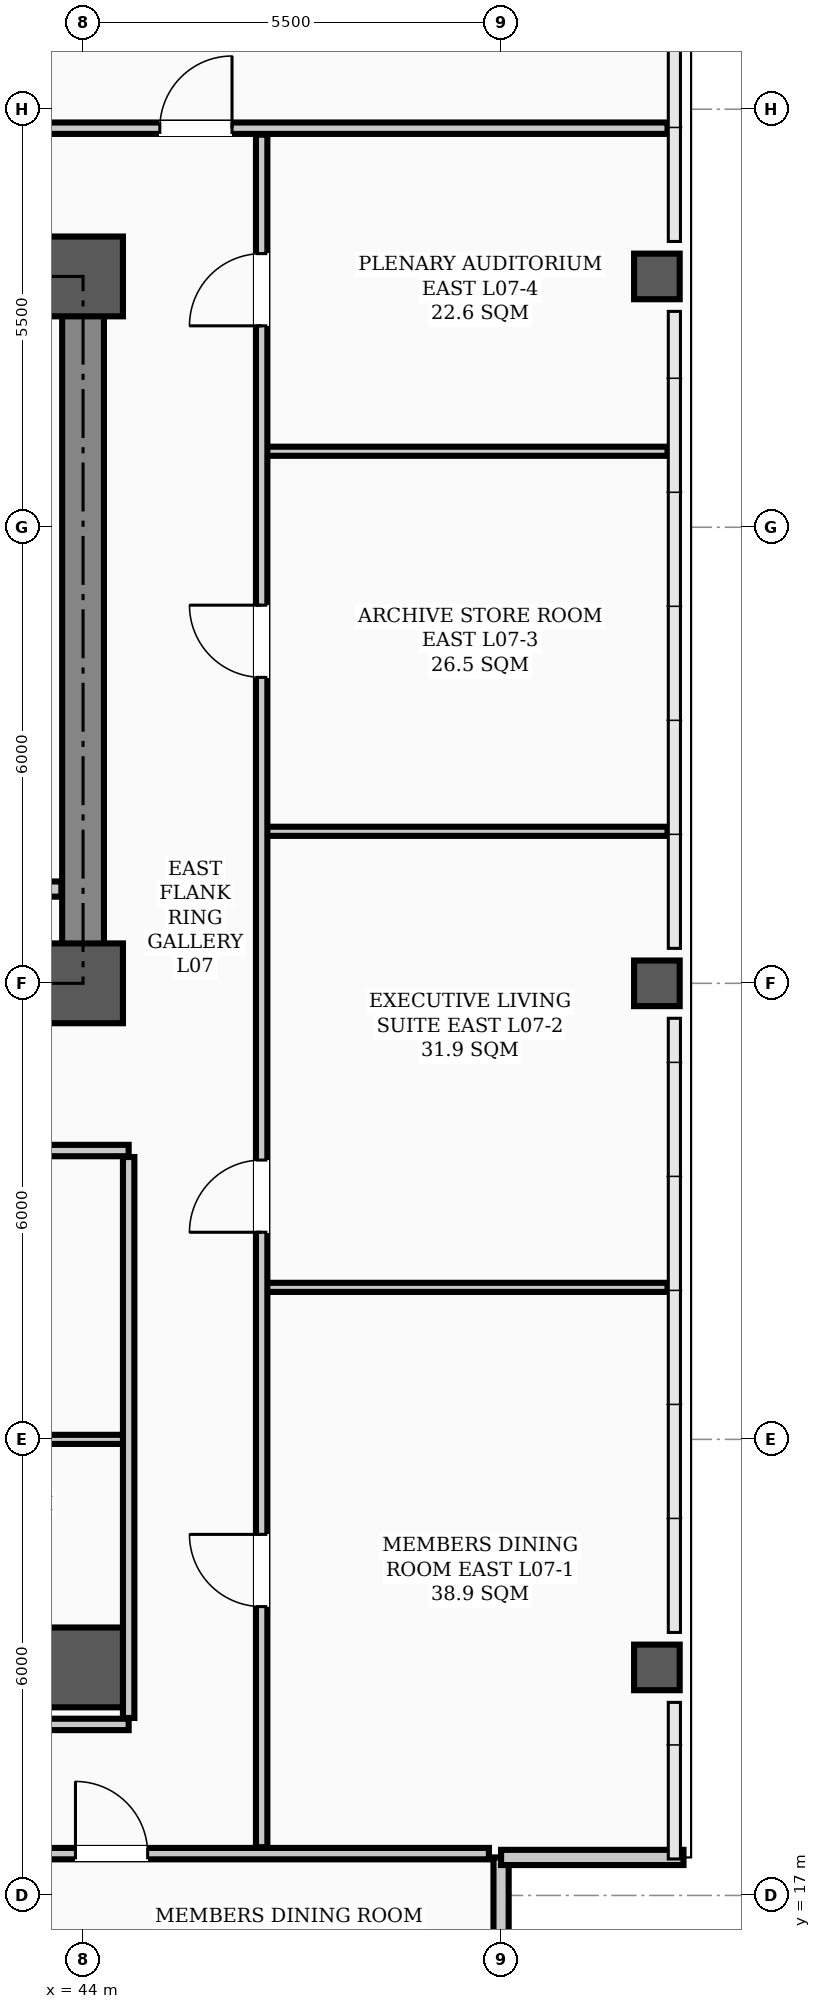
"""IFC4 building model, lengths in metres.
Left out: names, types, materials, properties, quantities, classifications, styles, units other than length and angle.
Written with IfcOpenShell. Run it as: python <this file> out.ifc"""

import sys

from ifc_helpers import new_model, si_unit, direction, frame, frame_2d, origin, origin_2d, place, context, subcontext, project, spatial, rectangle, hollow_rectangle, extrude, element, fill, save


model = new_model("IFC4")
c1 = context("Model", 3, precision=1e-05, world=origin(), true_north=direction((0.0, 1.0)))
c2 = subcontext(c1, "Body", "Model", "MODEL_VIEW")
j1 = project(units=[si_unit("LENGTHUNIT", "METRE"), si_unit("PLANEANGLEUNIT", "RADIAN")], contexts=[c1])
p1 = place(None, origin())
s1 = spatial("IfcSite", under=j1, at=p1, CompositionType="ELEMENT")
p2 = place(p1, origin())
s2 = spatial("IfcBuilding", under=s1, at=p2, CompositionType="ELEMENT")
p3 = place(p2, frame((0.0, 0.0, 30.4)))
s3 = spatial("IfcBuildingStorey", under=s2, at=p3, CompositionType="ELEMENT", Elevation=30.4)
for number, where, z_axis, x_axis in (
    (1, (44.0, 29.0, 0.0), (0.0, 0.0, 1.0), (1.0, 0.0, 0.0)),
    (2, (44.0, 38.3, 0.0), (0.0, 0.0, 1.0), (1.0, 0.0, 0.0)),
    (3, (44.0, 20.0, 0.0), (0.0, 0.0, 1.0), (1.0, 0.0, 0.0)),
):
    element("IfcColumn", number, at=place(p3, frame(where, z_axis=z_axis, x_axis=x_axis)), inside=s3, PredefinedType="COLUMN", context=c2, shape_type="SweptSolid", body=[
        extrude(hollow_rectangle(XDim=1.05, YDim=1.05, WallThickness=0.038, InnerFilletRadius=0.019, OuterFilletRadius=0.057, at=origin_2d()), origin(), (0.0, 0.0, 1.0), 3.9),
    ])
for number, where, z_axis, x_axis in (
    (4, (51.55, 20.0, 0.0), (0.0, 0.0, 1.0), (1.0, 0.0, 0.0)),
    (5, (51.55, 29.0, 0.0), (0.0, 0.0, 1.0), (1.0, 0.0, 0.0)),
    (6, (51.55, 38.3, 0.0), (0.0, 0.0, 1.0), (1.0, 0.0, 0.0)),
):
    element("IfcColumn", number, at=place(p3, frame(where, z_axis=z_axis, x_axis=x_axis)), inside=s3, PredefinedType="COLUMN", context=c2, shape_type="SweptSolid", body=[
        extrude(hollow_rectangle(XDim=0.6, YDim=0.6, WallThickness=0.026, InnerFilletRadius=0.013, OuterFilletRadius=0.039, at=origin_2d()), origin(), (0.0, 0.0, 1.0), 3.9),
    ])
for number, where, z_axis, x_axis in (
    (7, (49.5, 15.1, 0.0), (0.0, 0.0, 1.0), (0.0, 1.0, 0.0)),
    (8, (49.5, 17.5, 0.0), (0.0, 0.0, 1.0), (1.0, 0.0, 0.0)),
):
    element("IfcWall", number, at=place(p3, frame(where, z_axis=z_axis, x_axis=x_axis)), inside=s3, PredefinedType="PARAPET", context=c2, shape_type="SweptSolid", body=[
        extrude(rectangle(XDim=2.4, YDim=0.2, at=frame_2d((1.2, 0.0))), origin(), (0.0, 0.0, 1.0), 1.2),
    ])
p4 = place(p3, frame((13.5, 29.0, 0.0), z_axis=(0.0, 0.0, 1.0), x_axis=(1.0, 0.0, 0.0)))
e9 = element("IfcWall", 9, at=p4, inside=s3, PredefinedType="SHEAR", context=c2, shape_type="SweptSolid", body=[
    extrude(rectangle(XDim=30.5, YDim=0.55, at=frame_2d((15.25, 0.0))), origin(), (0.0, 0.0, 1.0), 3.72),
])
p5 = place(p4, frame((1.75, 0.0, 0.0)))
e10 = element("IfcOpeningElement", 10, at=p5, cuts=e9, PredefinedType="OPENING", context=c2, shape_type="SweptSolid", body=[
    extrude(rectangle(XDim=1.1, YDim=2.08, at=frame_2d((0.55, 1.04))), frame((0.0, 0.285, 0.0), z_axis=(0.0, -1.0, 0.0), x_axis=(1.0, 0.0, 0.0)), (0.0, 0.0, 1.0), 0.57),
])
p6 = place(p4, frame((26.7, 0.0, 0.0)))
e11 = element("IfcOpeningElement", 11, at=p6, cuts=e9, PredefinedType="OPENING", context=c2, shape_type="SweptSolid", body=[
    extrude(rectangle(XDim=1.1, YDim=2.08, at=frame_2d((0.55, 1.04))), frame((0.0, 0.285, 0.0), z_axis=(0.0, -1.0, 0.0), x_axis=(1.0, 0.0, 0.0)), (0.0, 0.0, 1.0), 0.57),
])
p7 = place(p4, frame((6.8, 0.0, 0.0)))
e12 = element("IfcOpeningElement", 12, at=p7, cuts=e9, PredefinedType="OPENING", context=c2, shape_type="SweptSolid", body=[
    extrude(rectangle(XDim=1.1, YDim=2.08, at=frame_2d((0.55, 1.04))), frame((0.0, 0.285, 0.0), z_axis=(0.0, -1.0, 0.0), x_axis=(1.0, 0.0, 0.0)), (0.0, 0.0, 1.0), 0.57),
])
p8 = place(p4, frame((13.2, 0.0, 0.0)))
e13 = element("IfcOpeningElement", 13, at=p8, cuts=e9, PredefinedType="OPENING", context=c2, shape_type="SweptSolid", body=[
    extrude(rectangle(XDim=1.6, YDim=2.08, at=frame_2d((0.8, 1.04))), frame((0.0, 0.285, 0.0), z_axis=(0.0, -1.0, 0.0), x_axis=(1.0, 0.0, 0.0)), (0.0, 0.0, 1.0), 0.57),
])
p9 = place(p4, frame((19.6, 0.0, 0.0)))
e14 = element("IfcOpeningElement", 14, at=p9, cuts=e9, PredefinedType="OPENING", context=c2, shape_type="SweptSolid", body=[
    extrude(rectangle(XDim=0.9, YDim=2.08, at=frame_2d((0.45, 1.04))), frame((0.0, 0.285, 0.0), z_axis=(0.0, -1.0, 0.0), x_axis=(1.0, 0.0, 0.0)), (0.0, 0.0, 1.0), 0.57),
])
p10 = place(p4, frame((21.6, 0.0, 0.0)))
e15 = element("IfcOpeningElement", 15, at=p10, cuts=e9, PredefinedType="OPENING", context=c2, shape_type="SweptSolid", body=[
    extrude(rectangle(XDim=0.9, YDim=2.08, at=frame_2d((0.45, 1.04))), frame((0.0, 0.285, 0.0), z_axis=(0.0, -1.0, 0.0), x_axis=(1.0, 0.0, 0.0)), (0.0, 0.0, 1.0), 0.57),
])
p11 = place(p3, frame((13.5, 38.3, 0.0), z_axis=(0.0, 0.0, 1.0), x_axis=(1.0, 0.0, 0.0)))
e16 = element("IfcWall", 16, at=p11, inside=s3, PredefinedType="SHEAR", context=c2, shape_type="SweptSolid", body=[
    extrude(rectangle(XDim=30.5, YDim=0.55, at=frame_2d((15.25, 0.0))), origin(), (0.0, 0.0, 1.0), 3.72),
])
p12 = place(p3, frame((44.0, 29.35, 0.0), z_axis=(0.0, 0.0, 1.0), x_axis=(0.0, 1.0, 0.0)))
e17 = element("IfcWall", 17, at=p12, inside=s3, PredefinedType="SHEAR", context=c2, shape_type="SweptSolid", body=[
    extrude(rectangle(XDim=8.6, YDim=0.55, at=frame_2d((4.3, 0.0))), origin(), (0.0, 0.0, 1.0), 3.72),
])
p13 = place(p3, frame((42.4, 30.24, 0.0), z_axis=(0.0, 0.0, 1.0), x_axis=(1.0, 0.0, 0.0)))
e18 = element("IfcWall", 18, at=p13, inside=s3, PredefinedType="STANDARD", context=c2, shape_type="SweptSolid", body=[
    extrude(rectangle(XDim=1.315, YDim=0.2, at=frame_2d((0.658, 0.0))), origin(), (0.0, 0.0, 1.0), 3.1),
])
p14 = place(p3, frame((12.9, 26.8, 0.0), z_axis=(0.0, 0.0, 1.0), x_axis=(1.0, 0.0, 0.0)))
e19 = element("IfcWall", 19, at=p14, inside=s3, PredefinedType="PARTITIONING", context=c2, shape_type="SweptSolid", body=[
    extrude(rectangle(XDim=31.7, YDim=0.15, at=frame_2d((15.85, 0.0))), origin(), (0.0, 0.0, 1.0), 3.1),
])
p15 = place(p14, frame((13.6, 0.0, 0.0)))
e20 = element("IfcOpeningElement", 20, at=p15, cuts=e19, PredefinedType="OPENING", context=c2, shape_type="SweptSolid", body=[
    extrude(rectangle(XDim=1.6, YDim=2.08, at=frame_2d((0.8, 1.04))), frame((0.0, 0.085, 0.0), z_axis=(0.0, -1.0, 0.0), x_axis=(1.0, 0.0, 0.0)), (0.0, 0.0, 1.0), 0.17),
])
p16 = place(p14, frame((1.775, 0.0, 0.0)))
e21 = element("IfcOpeningElement", 21, at=p16, cuts=e19, PredefinedType="OPENING", context=c2, shape_type="SweptSolid", body=[
    extrude(rectangle(XDim=0.95, YDim=2.08, at=frame_2d((0.475, 1.04))), frame((0.0, 0.085, 0.0), z_axis=(0.0, -1.0, 0.0), x_axis=(1.0, 0.0, 0.0)), (0.0, 0.0, 1.0), 0.17),
])
p17 = place(p14, frame((6.225, 0.0, 0.0)))
e22 = element("IfcOpeningElement", 22, at=p17, cuts=e19, PredefinedType="OPENING", context=c2, shape_type="SweptSolid", body=[
    extrude(rectangle(XDim=0.95, YDim=2.08, at=frame_2d((0.475, 1.04))), frame((0.0, 0.085, 0.0), z_axis=(0.0, -1.0, 0.0), x_axis=(1.0, 0.0, 0.0)), (0.0, 0.0, 1.0), 0.17),
])
p18 = place(p14, frame((10.625, 0.0, 0.0)))
e23 = element("IfcOpeningElement", 23, at=p18, cuts=e19, PredefinedType="OPENING", context=c2, shape_type="SweptSolid", body=[
    extrude(rectangle(XDim=0.95, YDim=2.08, at=frame_2d((0.475, 1.04))), frame((0.0, 0.085, 0.0), z_axis=(0.0, -1.0, 0.0), x_axis=(1.0, 0.0, 0.0)), (0.0, 0.0, 1.0), 0.17),
])
p19 = place(p14, frame((16.075, 0.0, 0.0)))
e24 = element("IfcOpeningElement", 24, at=p19, cuts=e19, PredefinedType="OPENING", context=c2, shape_type="SweptSolid", body=[
    extrude(rectangle(XDim=0.95, YDim=2.08, at=frame_2d((0.475, 1.04))), frame((0.0, 0.085, 0.0), z_axis=(0.0, -1.0, 0.0), x_axis=(1.0, 0.0, 0.0)), (0.0, 0.0, 1.0), 0.17),
])
p20 = place(p14, frame((21.925, 0.0, 0.0)))
e25 = element("IfcOpeningElement", 25, at=p20, cuts=e19, PredefinedType="OPENING", context=c2, shape_type="SweptSolid", body=[
    extrude(rectangle(XDim=0.95, YDim=2.08, at=frame_2d((0.475, 1.04))), frame((0.0, 0.085, 0.0), z_axis=(0.0, -1.0, 0.0), x_axis=(1.0, 0.0, 0.0)), (0.0, 0.0, 1.0), 0.17),
])
p21 = place(p14, frame((28.625, 0.0, 0.0)))
e26 = element("IfcOpeningElement", 26, at=p21, cuts=e19, PredefinedType="OPENING", context=c2, shape_type="SweptSolid", body=[
    extrude(rectangle(XDim=0.95, YDim=2.08, at=frame_2d((0.475, 1.04))), frame((0.0, 0.085, 0.0), z_axis=(0.0, -1.0, 0.0), x_axis=(1.0, 0.0, 0.0)), (0.0, 0.0, 1.0), 0.17),
])
p22 = place(p3, frame((4.66, 17.55, 0.0), z_axis=(0.0, 0.0, 1.0), x_axis=(1.0, 0.0, 0.0)))
e27 = element("IfcWall", 27, at=p22, inside=s3, PredefinedType="PARTITIONING", context=c2, shape_type="SweptSolid", body=[
    extrude(rectangle(XDim=44.68, YDim=0.15, at=frame_2d((22.34, 0.0))), origin(), (0.0, 0.0, 1.0), 3.1),
])
p23 = place(p22, frame((6.74, 0.0, 0.0)))
e28 = element("IfcOpeningElement", 28, at=p23, cuts=e27, PredefinedType="OPENING", context=c2, shape_type="SweptSolid", body=[
    extrude(rectangle(XDim=0.95, YDim=2.08, at=frame_2d((0.475, 1.04))), frame((0.0, 0.085, 0.0), z_axis=(0.0, -1.0, 0.0), x_axis=(1.0, 0.0, 0.0)), (0.0, 0.0, 1.0), 0.17),
])
p24 = place(p22, frame((13.865, 0.0, 0.0)))
e29 = element("IfcOpeningElement", 29, at=p24, cuts=e27, PredefinedType="OPENING", context=c2, shape_type="SweptSolid", body=[
    extrude(rectangle(XDim=0.95, YDim=2.08, at=frame_2d((0.475, 1.04))), frame((0.0, 0.085, 0.0), z_axis=(0.0, -1.0, 0.0), x_axis=(1.0, 0.0, 0.0)), (0.0, 0.0, 1.0), 0.17),
])
p25 = place(p22, frame((28.765, 0.0, 0.0)))
e30 = element("IfcOpeningElement", 30, at=p25, cuts=e27, PredefinedType="OPENING", context=c2, shape_type="SweptSolid", body=[
    extrude(rectangle(XDim=0.95, YDim=2.08, at=frame_2d((0.475, 1.04))), frame((0.0, 0.085, 0.0), z_axis=(0.0, -1.0, 0.0), x_axis=(1.0, 0.0, 0.0)), (0.0, 0.0, 1.0), 0.17),
])
p26 = place(p22, frame((34.465, 0.0, 0.0)))
e31 = element("IfcOpeningElement", 31, at=p26, cuts=e27, PredefinedType="OPENING", context=c2, shape_type="SweptSolid", body=[
    extrude(rectangle(XDim=0.95, YDim=2.08, at=frame_2d((0.475, 1.04))), frame((0.0, 0.085, 0.0), z_axis=(0.0, -1.0, 0.0), x_axis=(1.0, 0.0, 0.0)), (0.0, 0.0, 1.0), 0.17),
])
p27 = place(p22, frame((39.24, 0.0, 0.0)))
e32 = element("IfcOpeningElement", 32, at=p27, cuts=e27, PredefinedType="OPENING", context=c2, shape_type="SweptSolid", body=[
    extrude(rectangle(XDim=0.95, YDim=2.08, at=frame_2d((0.475, 1.04))), frame((0.0, 0.085, 0.0), z_axis=(0.0, -1.0, 0.0), x_axis=(1.0, 0.0, 0.0)), (0.0, 0.0, 1.0), 0.17),
])
p28 = place(p3, frame((28.4, 19.25, 0.0), z_axis=(0.0, 0.0, 1.0), x_axis=(1.0, 0.0, 0.0)))
e33 = element("IfcWall", 33, at=p28, inside=s3, PredefinedType="PARTITIONING", context=c2, shape_type="SweptSolid", body=[
    extrude(rectangle(XDim=16.2, YDim=0.15, at=frame_2d((8.1, 0.0))), origin(), (0.0, 0.0, 1.0), 3.1),
])
p29 = place(p28, frame((0.575, 0.0, 0.0)))
e34 = element("IfcOpeningElement", 34, at=p29, cuts=e33, PredefinedType="OPENING", context=c2, shape_type="SweptSolid", body=[
    extrude(rectangle(XDim=0.95, YDim=2.08, at=frame_2d((0.475, 1.04))), frame((0.0, 0.085, 0.0), z_axis=(0.0, -1.0, 0.0), x_axis=(1.0, 0.0, 0.0)), (0.0, 0.0, 1.0), 0.17),
])
p30 = place(p28, frame((6.425, 0.0, 0.0)))
e35 = element("IfcOpeningElement", 35, at=p30, cuts=e33, PredefinedType="OPENING", context=c2, shape_type="SweptSolid", body=[
    extrude(rectangle(XDim=0.95, YDim=2.08, at=frame_2d((0.475, 1.04))), frame((0.0, 0.085, 0.0), z_axis=(0.0, -1.0, 0.0), x_axis=(1.0, 0.0, 0.0)), (0.0, 0.0, 1.0), 0.17),
])
p31 = place(p28, frame((13.125, 0.0, 0.0)))
e36 = element("IfcOpeningElement", 36, at=p31, cuts=e33, PredefinedType="OPENING", context=c2, shape_type="SweptSolid", body=[
    extrude(rectangle(XDim=0.95, YDim=2.08, at=frame_2d((0.475, 1.04))), frame((0.0, 0.085, 0.0), z_axis=(0.0, -1.0, 0.0), x_axis=(1.0, 0.0, 0.0)), (0.0, 0.0, 1.0), 0.17),
])
p32 = place(p3, frame((39.4, 23.0, 0.0), z_axis=(0.0, 0.0, 1.0), x_axis=(1.0, 0.0, 0.0)))
e37 = element("IfcWall", 37, at=p32, inside=s3, PredefinedType="PARTITIONING", context=c2, shape_type="SweptSolid", body=[
    extrude(rectangle(XDim=5.2, YDim=0.12, at=frame_2d((2.6, 0.0))), origin(), (0.0, 0.0, 1.0), 3.1),
])
for number, where, z_axis, x_axis in (
    (38, (46.35, 25.0, 0.0), (0.0, 0.0, 1.0), (1.0, 0.0, 0.0)),
    (39, (46.35, 31.0, 0.0), (0.0, 0.0, 1.0), (1.0, 0.0, 0.0)),
    (40, (46.35, 36.0, 0.0), (0.0, 0.0, 1.0), (1.0, 0.0, 0.0)),
):
    element("IfcWall", number, at=place(p3, frame(where, z_axis=z_axis, x_axis=x_axis)), inside=s3, PredefinedType="PARTITIONING", context=c2, shape_type="SweptSolid", body=[
        extrude(rectangle(XDim=5.34, YDim=0.12, at=frame_2d((2.67, 0.0))), origin(), (0.0, 0.0, 1.0), 3.212),
    ])
p33 = place(p3, frame((2.31, 40.25, 0.0), z_axis=(0.0, 0.0, 1.0), x_axis=(1.0, 0.0, 0.0)))
e41 = element("IfcWall", 41, at=p33, inside=s3, PredefinedType="PARTITIONING", context=c2, shape_type="SweptSolid", body=[
    extrude(rectangle(XDim=49.38, YDim=0.15, at=frame_2d((24.69, 0.0))), origin(), (0.0, 0.0, 1.0), 3.1),
])
p34 = place(p33, frame((9.23, 0.0, 0.0)))
e42 = element("IfcOpeningElement", 42, at=p34, cuts=e41, PredefinedType="OPENING", context=c2, shape_type="SweptSolid", body=[
    extrude(rectangle(XDim=0.95, YDim=2.08, at=frame_2d((0.475, 1.04))), frame((0.0, 0.085, 0.0), z_axis=(0.0, -1.0, 0.0), x_axis=(1.0, 0.0, 0.0)), (0.0, 0.0, 1.0), 0.17),
])
p35 = place(p33, frame((18.715, 0.0, 0.0)))
e43 = element("IfcOpeningElement", 43, at=p35, cuts=e41, PredefinedType="OPENING", context=c2, shape_type="SweptSolid", body=[
    extrude(rectangle(XDim=0.95, YDim=2.08, at=frame_2d((0.475, 1.04))), frame((0.0, 0.085, 0.0), z_axis=(0.0, -1.0, 0.0), x_axis=(1.0, 0.0, 0.0)), (0.0, 0.0, 1.0), 0.17),
])
p36 = place(p33, frame((26.715, 0.0, 0.0)))
e44 = element("IfcOpeningElement", 44, at=p36, cuts=e41, PredefinedType="OPENING", context=c2, shape_type="SweptSolid", body=[
    extrude(rectangle(XDim=0.95, YDim=2.08, at=frame_2d((0.475, 1.04))), frame((0.0, 0.085, 0.0), z_axis=(0.0, -1.0, 0.0), x_axis=(1.0, 0.0, 0.0)), (0.0, 0.0, 1.0), 0.17),
])
p37 = place(p33, frame((31.765, 0.0, 0.0)))
e45 = element("IfcOpeningElement", 45, at=p37, cuts=e41, PredefinedType="OPENING", context=c2, shape_type="SweptSolid", body=[
    extrude(rectangle(XDim=0.95, YDim=2.08, at=frame_2d((0.475, 1.04))), frame((0.0, 0.085, 0.0), z_axis=(0.0, -1.0, 0.0), x_axis=(1.0, 0.0, 0.0)), (0.0, 0.0, 1.0), 0.17),
])
p38 = place(p33, frame((42.7, 0.0, 0.0)))
e46 = element("IfcOpeningElement", 46, at=p38, cuts=e41, PredefinedType="OPENING", context=c2, shape_type="SweptSolid", body=[
    extrude(rectangle(XDim=0.95, YDim=2.08, at=frame_2d((0.475, 1.04))), frame((0.0, 0.085, 0.0), z_axis=(0.0, -1.0, 0.0), x_axis=(1.0, 0.0, 0.0)), (0.0, 0.0, 1.0), 0.17),
])
p39 = place(p3, frame((46.35, 17.635, 0.0), z_axis=(0.0, 0.0, 1.0), x_axis=(0.0, 1.0, 0.0)))
e47 = element("IfcWall", 47, at=p39, inside=s3, PredefinedType="PARTITIONING", context=c2, shape_type="SweptSolid", body=[
    extrude(rectangle(XDim=22.53, YDim=0.15, at=frame_2d((11.265, 0.0))), origin(), (0.0, 0.0, 1.0), 3.0),
])
p40 = place(p39, frame((3.165, 0.0, 0.0)))
e48 = element("IfcOpeningElement", 48, at=p40, cuts=e47, PredefinedType="OPENING", context=c2, shape_type="SweptSolid", body=[
    extrude(rectangle(XDim=0.95, YDim=2.08, at=frame_2d((0.475, 1.04))), frame((0.0, 0.085, 0.0), z_axis=(0.0, -1.0, 0.0), x_axis=(1.0, 0.0, 0.0)), (0.0, 0.0, 1.0), 0.17),
])
p41 = place(p39, frame((8.09, 0.0, 0.0)))
e49 = element("IfcOpeningElement", 49, at=p41, cuts=e47, PredefinedType="OPENING", context=c2, shape_type="SweptSolid", body=[
    extrude(rectangle(XDim=0.95, YDim=2.08, at=frame_2d((0.475, 1.04))), frame((0.0, 0.085, 0.0), z_axis=(0.0, -1.0, 0.0), x_axis=(1.0, 0.0, 0.0)), (0.0, 0.0, 1.0), 0.17),
])
p42 = place(p39, frame((15.39, 0.0, 0.0)))
e50 = element("IfcOpeningElement", 50, at=p42, cuts=e47, PredefinedType="OPENING", context=c2, shape_type="SweptSolid", body=[
    extrude(rectangle(XDim=0.95, YDim=2.08, at=frame_2d((0.475, 1.04))), frame((0.0, 0.085, 0.0), z_axis=(0.0, -1.0, 0.0), x_axis=(1.0, 0.0, 0.0)), (0.0, 0.0, 1.0), 0.17),
])
p43 = place(p39, frame((20.015, 0.0, 0.0)))
e51 = element("IfcOpeningElement", 51, at=p43, cuts=e47, PredefinedType="OPENING", context=c2, shape_type="SweptSolid", body=[
    extrude(rectangle(XDim=0.95, YDim=2.08, at=frame_2d((0.475, 1.04))), frame((0.0, 0.085, 0.0), z_axis=(0.0, -1.0, 0.0), x_axis=(1.0, 0.0, 0.0)), (0.0, 0.0, 1.0), 0.17),
])
p44 = place(p3, frame((44.6, 19.335, 0.0), z_axis=(0.0, 0.0, 1.0), x_axis=(0.0, 1.0, 0.0)))
e52 = element("IfcWall", 52, at=p44, inside=s3, PredefinedType="PARTITIONING", context=c2, shape_type="SweptSolid", body=[
    extrude(rectangle(XDim=7.38, YDim=0.15, at=frame_2d((3.69, 0.0))), origin(), (0.0, 0.0, 1.0), 3.0),
])
p45 = place(p27, origin())
e53 = element("IfcDoor", 53, at=p45, inside=s3, OperationType="SINGLE_SWING_LEFT", PredefinedType="DOOR", context=c2, shape_type="SweptSolid", body=[
    extrude(rectangle(XDim=0.95, YDim=2.08, at=frame_2d((0.475, 1.04))), frame((0.0, 0.025, 0.0), z_axis=(0.0, -1.0, 0.0), x_axis=(1.0, 0.0, 0.0)), (0.0, 0.0, 1.0), 0.05),
])
fill(e32, e53)
p46 = place(p40, origin())
e54 = element("IfcDoor", 54, at=p46, inside=s3, OperationType="SINGLE_SWING_RIGHT", PredefinedType="DOOR", context=c2, shape_type="SweptSolid", body=[
    extrude(rectangle(XDim=0.95, YDim=2.08, at=frame_2d((0.475, 1.04))), frame((0.0, 0.025, 0.0), z_axis=(0.0, -1.0, 0.0), x_axis=(1.0, 0.0, 0.0)), (0.0, 0.0, 1.0), 0.05),
])
fill(e48, e54)
p47 = place(p41, origin())
e55 = element("IfcDoor", 55, at=p47, inside=s3, OperationType="SINGLE_SWING_LEFT", PredefinedType="DOOR", context=c2, shape_type="SweptSolid", body=[
    extrude(rectangle(XDim=0.95, YDim=2.08, at=frame_2d((0.475, 1.04))), frame((0.0, 0.025, 0.0), z_axis=(0.0, -1.0, 0.0), x_axis=(1.0, 0.0, 0.0)), (0.0, 0.0, 1.0), 0.05),
])
fill(e49, e55)
p48 = place(p42, origin())
e56 = element("IfcDoor", 56, at=p48, inside=s3, OperationType="SINGLE_SWING_RIGHT", PredefinedType="DOOR", context=c2, shape_type="SweptSolid", body=[
    extrude(rectangle(XDim=0.95, YDim=2.08, at=frame_2d((0.475, 1.04))), frame((0.0, 0.025, 0.0), z_axis=(0.0, -1.0, 0.0), x_axis=(1.0, 0.0, 0.0)), (0.0, 0.0, 1.0), 0.05),
])
fill(e50, e56)
p49 = place(p43, origin())
e57 = element("IfcDoor", 57, at=p49, inside=s3, OperationType="SINGLE_SWING_LEFT", PredefinedType="DOOR", context=c2, shape_type="SweptSolid", body=[
    extrude(rectangle(XDim=0.95, YDim=2.08, at=frame_2d((0.475, 1.04))), frame((0.0, 0.025, 0.0), z_axis=(0.0, -1.0, 0.0), x_axis=(1.0, 0.0, 0.0)), (0.0, 0.0, 1.0), 0.05),
])
fill(e51, e57)
p50 = place(p38, origin())
e58 = element("IfcDoor", 58, at=p50, inside=s3, OperationType="SINGLE_SWING_RIGHT", PredefinedType="DOOR", context=c2, shape_type="SweptSolid", body=[
    extrude(rectangle(XDim=0.95, YDim=2.08, at=frame_2d((0.475, 1.04))), frame((0.0, 0.025, 0.0), z_axis=(0.0, -1.0, 0.0), x_axis=(1.0, 0.0, 0.0)), (0.0, 0.0, 1.0), 0.05),
])
fill(e46, e58)
save(model, sys.argv[1])
